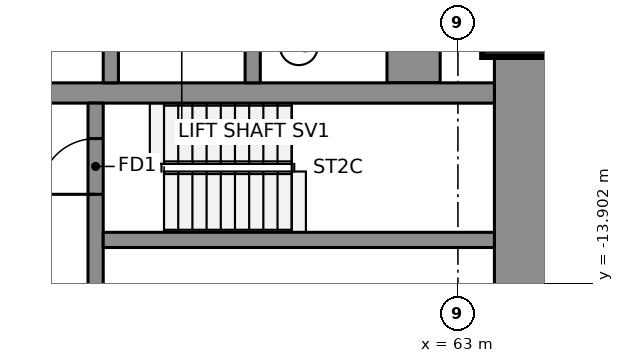
"""IFC4 building model, lengths in metres.
Left out: names, types, materials, properties, quantities, classifications, styles, units other than length and angle.
Written with IfcOpenShell. Run it as: python <this file> out.ifc"""

import sys

from ifc_helpers import new_model, si_unit, direction, frame, frame_2d, origin, origin_2d, place, context, subcontext, project, spatial, rectangle, extrude, element, fill, save


model = new_model("IFC4")
c1 = context("Model", 3, precision=1e-05, world=origin(), true_north=direction((0.0, 1.0)))
c2 = subcontext(c1, "Body", "Model", "MODEL_VIEW")
j1 = project(units=[si_unit("LENGTHUNIT", "METRE"), si_unit("PLANEANGLEUNIT", "RADIAN")], contexts=[c1])
p1 = place(None, origin())
s1 = spatial("IfcSite", under=j1, at=p1, CompositionType="ELEMENT")
p2 = place(p1, origin())
s2 = spatial("IfcBuilding", under=s1, at=p2, CompositionType="ELEMENT")
p3 = place(p2, frame((0.0, 0.0, 99.1)))
s3 = spatial("IfcBuildingStorey", under=s2, at=p3, CompositionType="ELEMENT", Elevation=99.1)
p4 = place(p3, frame((64.245, -15.75, 0.0), z_axis=(0.0, 0.0, 1.0), x_axis=(0.0, 1.0, 0.0)))
e1 = element("IfcWall", 1, at=p4, inside=s3, PredefinedType="SHEAR", context=c2, shape_type="SweptSolid", body=[
    extrude(rectangle(XDim=6.361, YDim=1.05, at=frame_2d((3.181, 0.0))), origin(), (0.0, 0.0, 1.0), 3.55),
])
p5 = place(p3, frame((62.125, -9.95, 0.0), z_axis=(0.0, 0.0, 1.0), x_axis=(0.0, 1.0, 0.0)))
e2 = element("IfcWall", 2, at=p5, inside=s3, PredefinedType="SHEAR", context=c2, shape_type="SweptSolid", body=[
    extrude(rectangle(XDim=19.9, YDim=1.05, at=frame_2d((9.95, 0.0))), origin(), (0.0, 0.0, 1.0), 3.55),
])
p6 = place(p3, frame((50.7, -10.15, 0.0), z_axis=(0.0, 0.0, 1.0), x_axis=(1.0, 0.0, 0.0)))
e3 = element("IfcWall", 3, at=p6, inside=s3, PredefinedType="SHEAR", context=c2, shape_type="SweptSolid", body=[
    extrude(rectangle(XDim=13.02, YDim=0.4, at=frame_2d((6.51, 0.0))), origin(), (0.0, 0.0, 1.0), 3.55),
])
for number, where, z_axis, x_axis in (
    (4, (56.15, -9.95, 0.0), (0.0, 0.0, 1.0), (0.0, 1.0, 0.0)),
    (5, (58.95, -9.95, 0.0), (0.0, 0.0, 1.0), (0.0, 1.0, 0.0)),
):
    element("IfcWall", number, at=place(p3, frame(where, z_axis=z_axis, x_axis=x_axis)), inside=s3, PredefinedType="SHEAR", context=c2, shape_type="SweptSolid", body=[
        extrude(rectangle(XDim=3.0, YDim=0.3, at=frame_2d((1.5, 0.0))), origin(), (0.0, 0.0, 1.0), 3.55),
    ])
p7 = place(p3, frame((55.85, -15.75, 0.0), z_axis=(0.0, 0.0, 1.0), x_axis=(0.0, 1.0, 0.0)))
e6 = element("IfcWall", 6, at=p7, inside=s3, PredefinedType="SHEAR", context=c2, shape_type="SweptSolid", body=[
    extrude(rectangle(XDim=5.4, YDim=0.3, at=frame_2d((2.7, 0.0))), origin(), (0.0, 0.0, 1.0), 3.55),
])
p8 = place(p7, frame((3.6, 0.0, 0.0)))
e7 = element("IfcOpeningElement", 7, at=p8, cuts=e6, PredefinedType="OPENING", context=c2, shape_type="SweptSolid", body=[
    extrude(rectangle(XDim=1.1, YDim=2.1, at=frame_2d((0.55, 1.05))), frame((0.0, 0.16, 0.0), z_axis=(0.0, -1.0, 0.0), x_axis=(1.0, 0.0, 0.0)), (0.0, 0.0, 1.0), 0.32),
])
p9 = place(p7, frame((0.8, 0.0, 0.0)))
e8 = element("IfcOpeningElement", 8, at=p9, cuts=e6, PredefinedType="OPENING", context=c2, shape_type="SweptSolid", body=[
    extrude(rectangle(XDim=0.9, YDim=2.1, at=frame_2d((0.45, 1.05))), frame((0.0, 0.16, 0.0), z_axis=(0.0, -1.0, 0.0), x_axis=(1.0, 0.0, 0.0)), (0.0, 0.0, 1.0), 0.32),
])
p10 = place(p3, frame((56.0, -13.05, 0.0), z_axis=(0.0, 0.0, 1.0), x_axis=(1.0, 0.0, 0.0)))
e9 = element("IfcWall", 9, at=p10, inside=s3, PredefinedType="SHEAR", context=c2, shape_type="SweptSolid", body=[
    extrude(rectangle(XDim=7.72, YDim=0.3, at=frame_2d((3.86, 0.0))), origin(), (0.0, 0.0, 1.0), 3.55),
])
p11 = place(p3, frame((64.329, -8.589, 0.0), z_axis=(0.0, 0.0, 1.0), x_axis=(1.0, 0.0, 0.0)))
e10 = element("IfcColumn", 10, at=p11, inside=s3, PredefinedType="COLUMN", context=c2, shape_type="SweptSolid", body=[
    extrude(rectangle(XDim=1.7, YDim=1.7, at=origin_2d()), origin(), (0.0, 0.0, 1.0), 3.55),
])
p12 = place(p8, origin())
e11 = element("IfcDoor", 11, at=p12, inside=s3, OperationType="SINGLE_SWING_RIGHT", PredefinedType="DOOR", context=c2, shape_type="SweptSolid", body=[
    extrude(rectangle(XDim=1.1, YDim=2.1, at=frame_2d((0.55, 1.05))), frame((0.0, 0.025, 0.0), z_axis=(0.0, -1.0, 0.0), x_axis=(1.0, 0.0, 0.0)), (0.0, 0.0, 1.0), 0.05),
])
fill(e7, e11)
save(model, sys.argv[1])
